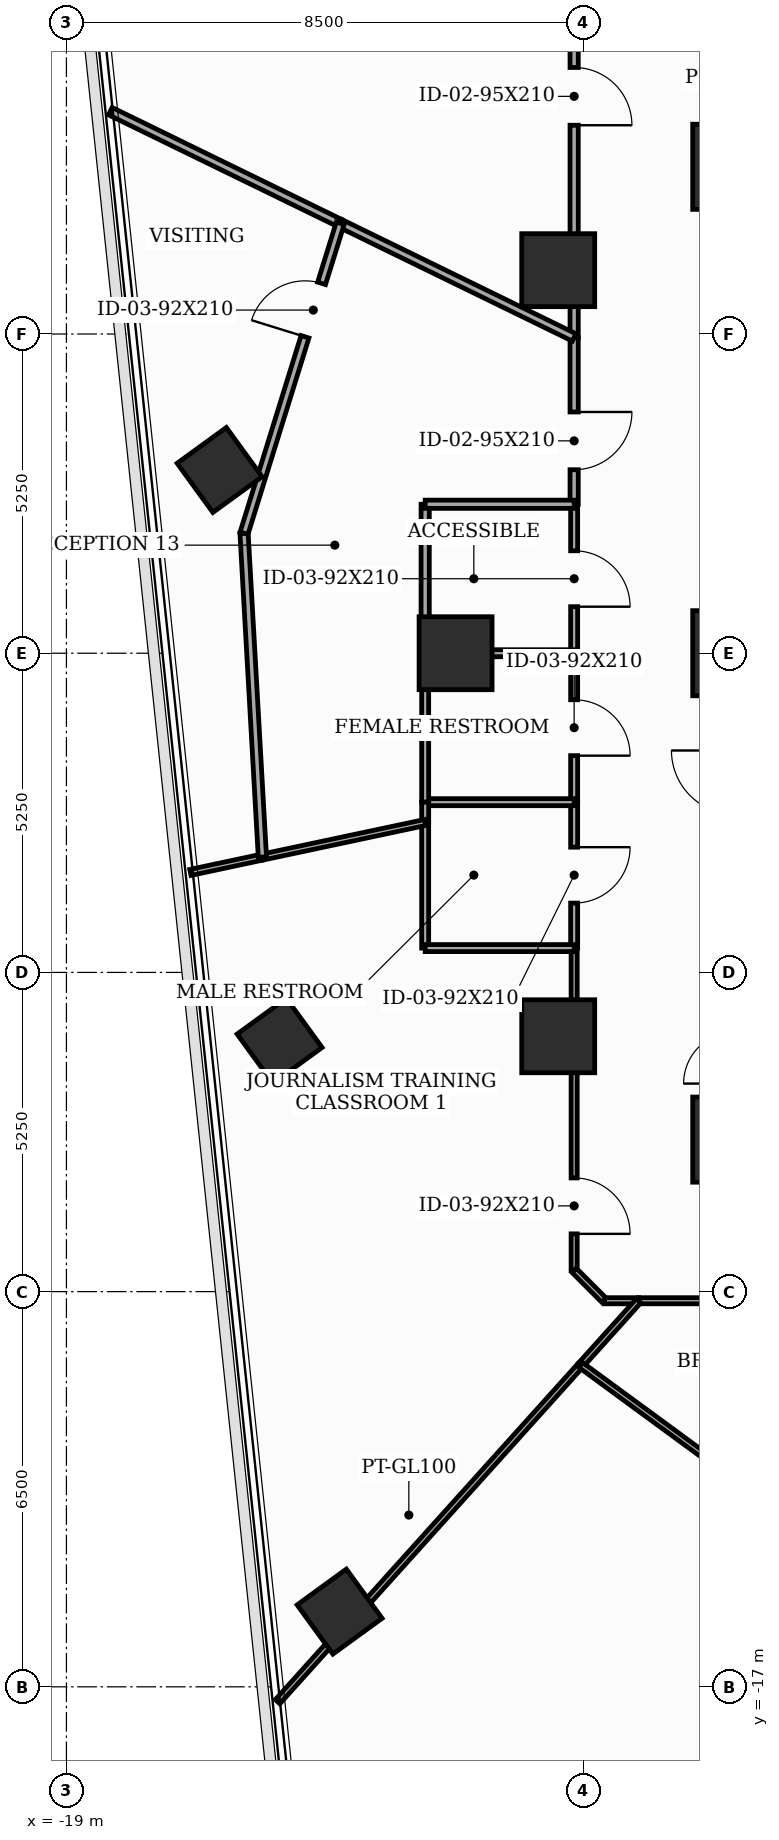
"""IFC4 building model, lengths in metres.
Left out: names, types, materials, properties, quantities, classifications, styles, units other than length and angle.
Written with IfcOpenShell. Run it as: python <this file> out.ifc"""

import sys

from ifc_helpers import new_model, si_unit, direction, frame, frame_2d, origin, origin_2d, place, context, subcontext, project, spatial, rectangle, extrude, element, fill, save


model = new_model("IFC4")
c1 = context("Model", 3, precision=1e-05, world=origin(), true_north=direction((0.0, 1.0)))
c2 = subcontext(c1, "Body", "Model", "MODEL_VIEW")
j1 = project(units=[si_unit("LENGTHUNIT", "METRE"), si_unit("PLANEANGLEUNIT", "RADIAN")], contexts=[c1])
p1 = place(None, origin())
s1 = spatial("IfcSite", under=j1, at=p1, CompositionType="ELEMENT")
p2 = place(p1, origin())
s2 = spatial("IfcBuilding", under=s1, at=p2, CompositionType="ELEMENT")
p3 = place(p2, frame((0.0, 0.0, 169.4)))
s3 = spatial("IfcBuildingStorey", under=s2, at=p3, CompositionType="ELEMENT", Elevation=169.4)
for number, where, z_axis, x_axis in (
    (1, (-8.0, -8.0, 0.0), (0.0, 0.0, 1.0), (1.0, 0.0, 0.0)),
    (2, (-8.0, 8.0, 0.0), (0.0, 0.0, 1.0), (1.0, 0.0, 0.0)),
    (3, (-8.0, 0.0, 0.0), (0.0, 0.0, 1.0), (1.0, 0.0, 0.0)),
):
    element("IfcColumn", number, at=place(p3, frame(where, z_axis=z_axis, x_axis=x_axis)), inside=s3, PredefinedType="COLUMN", context=c2, shape_type="SweptSolid", body=[
        extrude(rectangle(XDim=1.4, YDim=1.4, at=origin_2d()), origin(), (0.0, 0.0, 1.0), 3.7),
    ])
for number, where, z_axis, x_axis in (
    (4, (-10.912, 6.3, 0.0), (0.0, 0.0, 1.0), (1.0, 0.0, 0.0)),
    (5, (-12.6, 0.0, 0.0), (0.0, 0.0, 1.0), (1.0, 0.0, 0.0)),
    (6, (-10.912, -6.3, 0.0), (0.0, 0.0, 1.0), (1.0, 0.0, 0.0)),
):
    element("IfcColumn", number, at=place(p3, frame(where, z_axis=z_axis, x_axis=x_axis)), inside=s3, PredefinedType="COLUMN", context=c2, shape_type="SweptSolid", body=[
        extrude(rectangle(XDim=1.2, YDim=1.2, at=origin_2d()), origin(), (0.0, 0.0, 1.0), 3.7),
    ])
for number, where, z_axis, x_axis in (
    (7, (-16.481, 3.014, 0.0), (0.0, 0.0, 1.0), (0.809, 0.588, 0.0)),
    (8, (-15.494, -6.375, 0.0), (0.0, 0.0, 1.0), (0.809, 0.588, 0.0)),
    (9, (-14.507, -15.763, 0.0), (0.0, 0.0, 1.0), (0.809, 0.588, 0.0)),
):
    element("IfcColumn", number, at=place(p3, frame(where, z_axis=z_axis, x_axis=x_axis)), inside=s3, PredefinedType="COLUMN", context=c2, shape_type="SweptSolid", body=[
        extrude(rectangle(XDim=1.0, YDim=1.0, at=origin_2d()), origin(), (0.0, 0.0, 1.0), 3.7),
    ])
p4 = place(p3, frame((-10.65, 0.0, 0.0), z_axis=(0.0, 0.0, 1.0), x_axis=(0.0, -1.0, 0.0)))
e10 = element("IfcWall", 10, at=p4, inside=s3, PredefinedType="PARTITIONING", context=c2, shape_type="SweptSolid", body=[
    extrude(rectangle(XDim=2.45, YDim=0.115, at=frame_2d((1.225, 0.0))), origin(), (0.0, 0.0, 1.0), 2.885),
])
p5 = place(p4, frame((0.765, 0.0, 0.0)))
e11 = element("IfcOpeningElement", 11, at=p5, cuts=e10, PredefinedType="OPENING", context=c2, shape_type="SweptSolid", body=[
    extrude(rectangle(XDim=0.92, YDim=2.1, at=frame_2d((0.46, 1.05))), frame((0.0, 0.067, 0.0), z_axis=(0.0, -1.0, 0.0), x_axis=(1.0, 0.0, 0.0)), (0.0, 0.0, 1.0), 0.135),
])
p6 = place(p3, frame((-10.65, -2.45, 0.0), z_axis=(0.0, 0.0, 1.0), x_axis=(0.0, -1.0, 0.0)))
e12 = element("IfcWall", 12, at=p6, inside=s3, PredefinedType="PARTITIONING", context=c2, shape_type="SweptSolid", body=[
    extrude(rectangle(XDim=2.4, YDim=0.115, at=frame_2d((1.2, 0.0))), origin(), (0.0, 0.0, 1.0), 3.5),
])
p7 = place(p6, frame((0.74, 0.0, 0.0)))
e13 = element("IfcOpeningElement", 13, at=p7, cuts=e12, PredefinedType="OPENING", context=c2, shape_type="SweptSolid", body=[
    extrude(rectangle(XDim=0.92, YDim=2.1, at=frame_2d((0.46, 1.05))), frame((0.0, 0.067, 0.0), z_axis=(0.0, -1.0, 0.0), x_axis=(1.0, 0.0, 0.0)), (0.0, 0.0, 1.0), 0.135),
])
p8 = place(p3, frame((-10.65, -4.85, 0.0), z_axis=(0.0, 0.0, 1.0), x_axis=(0.0, -1.0, 0.0)))
e14 = element("IfcWall", 14, at=p8, inside=s3, PredefinedType="MOVABLE", context=c2, shape_type="SweptSolid", body=[
    extrude(rectangle(XDim=5.3, YDim=0.1, at=frame_2d((2.65, 0.0))), origin(), (0.0, 0.0, 1.0), 2.885),
])
p9 = place(p8, frame((3.78, 0.0, 0.0)))
e15 = element("IfcOpeningElement", 15, at=p9, cuts=e14, PredefinedType="OPENING", context=c2, shape_type="SweptSolid", body=[
    extrude(rectangle(XDim=0.92, YDim=2.1, at=frame_2d((0.46, 1.05))), frame((0.0, 0.06, 0.0), z_axis=(0.0, -1.0, 0.0), x_axis=(1.0, 0.0, 0.0)), (0.0, 0.0, 1.0), 0.12),
])
p10 = place(p3, frame((-10.65, -10.15, 0.0), z_axis=(0.0, 0.0, 1.0), x_axis=(0.707106781187, -0.707106781187, 0.0)))
e16 = element("IfcWall", 16, at=p10, inside=s3, PredefinedType="MOVABLE", context=c2, shape_type="SweptSolid", body=[
    extrude(rectangle(XDim=0.707, YDim=0.1, at=frame_2d((0.354, 0.0))), origin(), (0.0, 0.0, 1.0), 3.5),
])
p11 = place(p3, frame((-10.15, -10.65, 0.0), z_axis=(0.0, 0.0, 1.0), x_axis=(1.0, 0.0, 0.0)))
e17 = element("IfcWall", 17, at=p11, inside=s3, PredefinedType="MOVABLE", context=c2, shape_type="SweptSolid", body=[
    extrude(rectangle(XDim=0.561, YDim=0.1, at=frame_2d((0.28, 0.0))), origin(), (0.0, 0.0, 1.0), 3.5),
])
p12 = place(p3, frame((-9.589, -10.65, 0.0), z_axis=(0.0, 0.0, 1.0), x_axis=(1.0, 0.0, 0.0)))
e18 = element("IfcWall", 18, at=p12, inside=s3, PredefinedType="MOVABLE", context=c2, shape_type="SweptSolid", body=[
    extrude(rectangle(XDim=6.535, YDim=0.1, at=frame_2d((3.268, 0.0))), origin(), (0.0, 0.0, 1.0), 2.885),
])
p13 = place(p3, frame((-10.65, 10.15, 0.0), z_axis=(0.0, 0.0, 1.0), x_axis=(0.0, -1.0, 0.0)))
e19 = element("IfcWall", 19, at=p13, inside=s3, PredefinedType="PARTITIONING", context=c2, shape_type="SweptSolid", body=[
    extrude(rectangle(XDim=4.956, YDim=0.135, at=frame_2d((2.478, 0.0))), origin(), (0.0, 0.0, 1.0), 2.885),
])
p14 = place(p13, frame((0.516, 0.0, 0.0)))
e20 = element("IfcOpeningElement", 20, at=p14, cuts=e19, PredefinedType="OPENING", context=c2, shape_type="SweptSolid", body=[
    extrude(rectangle(XDim=0.95, YDim=2.1, at=frame_2d((0.475, 1.05))), frame((0.0, 0.077, 0.0), z_axis=(0.0, -1.0, 0.0), x_axis=(1.0, 0.0, 0.0)), (0.0, 0.0, 1.0), 0.155),
])
p15 = place(p3, frame((-10.65, 5.194, 0.0), z_axis=(0.0, 0.0, 1.0), x_axis=(0.0, -1.0, 0.0)))
e21 = element("IfcWall", 21, at=p15, inside=s3, PredefinedType="PARTITIONING", context=c2, shape_type="SweptSolid", body=[
    extrude(rectangle(XDim=2.744, YDim=0.135, at=frame_2d((1.372, 0.0))), origin(), (0.0, 0.0, 1.0), 3.5),
])
p16 = place(p15, frame((1.226, 0.0, 0.0)))
e22 = element("IfcOpeningElement", 22, at=p16, cuts=e21, PredefinedType="OPENING", context=c2, shape_type="SweptSolid", body=[
    extrude(rectangle(XDim=0.95, YDim=2.1, at=frame_2d((0.475, 1.05))), frame((0.0, 0.077, 0.0), z_axis=(0.0, -1.0, 0.0), x_axis=(1.0, 0.0, 0.0)), (0.0, 0.0, 1.0), 0.155),
])
p17 = place(p3, frame((-10.65, 2.45, 0.0), z_axis=(0.0, 0.0, 1.0), x_axis=(0.0, -1.0, 0.0)))
e23 = element("IfcWall", 23, at=p17, inside=s3, PredefinedType="PARTITIONING", context=c2, shape_type="SweptSolid", body=[
    extrude(rectangle(XDim=2.45, YDim=0.115, at=frame_2d((1.225, 0.0))), origin(), (0.0, 0.0, 1.0), 2.885),
])
p18 = place(p17, frame((0.765, 0.0, 0.0)))
e24 = element("IfcOpeningElement", 24, at=p18, cuts=e23, PredefinedType="OPENING", context=c2, shape_type="SweptSolid", body=[
    extrude(rectangle(XDim=0.92, YDim=2.1, at=frame_2d((0.46, 1.05))), frame((0.0, 0.067, 0.0), z_axis=(0.0, -1.0, 0.0), x_axis=(1.0, 0.0, 0.0)), (0.0, 0.0, 1.0), 0.135),
])
p19 = place(p3, frame((-13.1, -2.45, 0.0), z_axis=(0.0, 0.0, 1.0), x_axis=(1.0, 0.0, 0.0)))
e25 = element("IfcWall", 25, at=p19, inside=s3, PredefinedType="PARTITIONING", context=c2, shape_type="SweptSolid", body=[
    extrude(rectangle(XDim=2.45, YDim=0.115, at=frame_2d((1.225, 0.0))), origin(), (0.0, 0.0, 1.0), 2.885),
])
p20 = place(p3, frame((-13.1, 0.0, 0.0), z_axis=(0.0, 0.0, 1.0), x_axis=(0.0, -1.0, 0.0)))
e26 = element("IfcWall", 26, at=p20, inside=s3, PredefinedType="PARTITIONING", context=c2, shape_type="SweptSolid", body=[
    extrude(rectangle(XDim=2.45, YDim=0.115, at=frame_2d((1.225, 0.0))), origin(), (0.0, 0.0, 1.0), 3.5),
])
p21 = place(p3, frame((-10.65, 0.0, 0.0), z_axis=(0.0, 0.0, 1.0), x_axis=(-1.0, 0.0, 0.0)))
e27 = element("IfcWall", 27, at=p21, inside=s3, PredefinedType="PARTITIONING", context=c2, shape_type="SweptSolid", body=[
    extrude(rectangle(XDim=2.45, YDim=0.115, at=frame_2d((1.225, 0.0))), origin(), (0.0, 0.0, 1.0), 2.885),
])
p22 = place(p3, frame((-13.1, -2.784, 0.0), z_axis=(0.0, 0.0, 1.0), x_axis=(0.0, -1.0, 0.0)))
e28 = element("IfcWall", 28, at=p22, inside=s3, PredefinedType="PARTITIONING", context=c2, shape_type="SweptSolid", body=[
    extrude(rectangle(XDim=2.066, YDim=0.115, at=frame_2d((1.033, 0.0))), origin(), (0.0, 0.0, 1.0), 3.5),
])
p23 = place(p3, frame((-13.1, -4.85, 0.0), z_axis=(0.0, 0.0, 1.0), x_axis=(1.0, 0.0, 0.0)))
e29 = element("IfcWall", 29, at=p23, inside=s3, PredefinedType="PARTITIONING", context=c2, shape_type="SweptSolid", body=[
    extrude(rectangle(XDim=2.45, YDim=0.115, at=frame_2d((1.225, 0.0))), origin(), (0.0, 0.0, 1.0), 2.885),
])
p24 = place(p3, frame((-13.1, -2.45, 0.0), z_axis=(0.0, 0.0, 1.0), x_axis=(0.0, -1.0, 0.0)))
e30 = element("IfcWall", 30, at=p24, inside=s3, PredefinedType="PARTITIONING", context=c2, shape_type="SweptSolid", body=[
    extrude(rectangle(XDim=0.334, YDim=0.115, at=frame_2d((0.167, 0.0))), origin(), (0.0, 0.0, 1.0), 3.5),
])
p25 = place(p3, frame((-10.541, -11.707, 0.0), z_axis=(0.0, 0.0, 1.0), x_axis=(0.669154347467, 0.743123448201, 0.0)))
e31 = element("IfcWall", 31, at=p25, inside=s3, PredefinedType="MOVABLE", context=c2, shape_type="SweptSolid", body=[
    extrude(rectangle(XDim=1.423, YDim=0.1, at=frame_2d((0.711, 0.0))), origin(), (0.0, 0.0, 1.0), 3.5),
])
p26 = place(p3, frame((-15.528, -17.245, 0.0), z_axis=(0.0, 0.0, 1.0), x_axis=(0.669169234172, 0.74311004302, 0.0)))
e32 = element("IfcWall", 32, at=p26, inside=s3, PredefinedType="MOVABLE", context=c2, shape_type="SweptSolid", body=[
    extrude(rectangle(XDim=7.452, YDim=0.1, at=frame_2d((3.726, 0.0))), origin(), (0.0, 0.0, 1.0), 2.885),
])
p27 = place(p3, frame((-15.777, -3.353, 0.0), z_axis=(0.0, 0.0, 1.0), x_axis=(-0.978029023755, -0.208468771503, 0.0)))
e33 = element("IfcWall", 33, at=p27, inside=s3, PredefinedType="MOVABLE", context=c2, shape_type="SweptSolid", body=[
    extrude(rectangle(XDim=1.211, YDim=0.1, at=frame_2d((0.605, 0.0))), origin(), (0.0, 0.0, 1.0), 2.985),
])
p28 = place(p3, frame((-13.1, -2.784, 0.0), z_axis=(0.0, 0.0, 1.0), x_axis=(-0.978141843994, -0.207938772307, 0.0)))
e34 = element("IfcWall", 34, at=p28, inside=s3, PredefinedType="MOVABLE", context=c2, shape_type="SweptSolid", body=[
    extrude(rectangle(XDim=2.737, YDim=0.1, at=frame_2d((1.368, 0.0))), origin(), (0.0, 0.0, 1.0), 2.985),
])
p29 = place(p3, frame((-10.541, -11.707, 0.0), z_axis=(0.0, 0.0, 1.0), x_axis=(0.806504929698, -0.591227366055, 0.0)))
e35 = element("IfcWall", 35, at=p29, inside=s3, PredefinedType="MOVABLE", context=c2, shape_type="SweptSolid", body=[
    extrude(rectangle(XDim=3.572, YDim=0.1, at=frame_2d((1.786, 0.0))), origin(), (0.0, 0.0, 1.0), 2.885),
])
p30 = place(p3, frame((-18.277, 8.915, 0.0), z_axis=(0.0, 0.0, 1.0), x_axis=(0.898795221882, -0.43836873648, 0.0)))
e36 = element("IfcWall", 36, at=p30, inside=s3, PredefinedType="PARTITIONING", context=c2, shape_type="SweptSolid", body=[
    extrude(rectangle(XDim=4.206, YDim=0.135, at=frame_2d((2.103, 0.0))), origin(), (0.0, 0.0, 1.0), 2.985),
])
p31 = place(p3, frame((-14.497, 7.071, 0.0), z_axis=(0.0, 0.0, 1.0), x_axis=(0.89874213328, -0.438477568261, 0.0)))
e37 = element("IfcWall", 37, at=p31, inside=s3, PredefinedType="PARTITIONING", context=c2, shape_type="SweptSolid", body=[
    extrude(rectangle(XDim=4.281, YDim=0.135, at=frame_2d((2.14, 0.0))), origin(), (0.0, 0.0, 1.0), 2.885),
])
p32 = place(p3, frame((-15.777, -3.353, 0.0), z_axis=(0.0, 0.0, 1.0), x_axis=(-0.056600228811, 0.99839692212, 0.0)))
e38 = element("IfcWall", 38, at=p32, inside=s3, PredefinedType="PARTITIONING", context=c2, shape_type="SweptSolid", body=[
    extrude(rectangle(XDim=5.336, YDim=0.135, at=frame_2d((2.668, 0.0))), origin(), (0.0, 0.0, 1.0), 2.985),
])
p33 = place(p3, frame((-16.079, 1.974, 0.0), z_axis=(0.0, 0.0, 1.0), x_axis=(0.296438064518, 0.955052079158, 0.0)))
e39 = element("IfcWall", 39, at=p33, inside=s3, PredefinedType="PARTITIONING", context=c2, shape_type="SweptSolid", body=[
    extrude(rectangle(XDim=5.337, YDim=0.135, at=frame_2d((2.668, 0.0))), origin(), (0.0, 0.0, 1.0), 2.885),
])
p34 = place(p33, frame((3.383, 0.0, 0.0)))
e40 = element("IfcOpeningElement", 40, at=p34, cuts=e39, PredefinedType="OPENING", context=c2, shape_type="SweptSolid", body=[
    extrude(rectangle(XDim=0.92, YDim=2.1, at=frame_2d((0.46, 1.05))), frame((0.0, 0.077, 0.0), z_axis=(0.0, -1.0, 0.0), x_axis=(1.0, 0.0, 0.0)), (0.0, 0.0, 1.0), 0.155),
])
p35 = place(p3, frame((-13.1, 0.0, 0.0), z_axis=(0.0, 0.0, 1.0), x_axis=(0.0, 1.0, 0.0)))
e41 = element("IfcWall", 41, at=p35, inside=s3, PredefinedType="PARTITIONING", context=c2, shape_type="SweptSolid", body=[
    extrude(rectangle(XDim=2.45, YDim=0.135, at=frame_2d((1.225, 0.0))), origin(), (0.0, 0.0, 1.0), 2.885),
])
p36 = place(p3, frame((-13.1, 2.45, 0.0), z_axis=(0.0, 0.0, 1.0), x_axis=(1.0, 0.0, 0.0)))
e42 = element("IfcWall", 42, at=p36, inside=s3, PredefinedType="PARTITIONING", context=c2, shape_type="SweptSolid", body=[
    extrude(rectangle(XDim=2.45, YDim=0.135, at=frame_2d((1.225, 0.0))), origin(), (0.0, 0.0, 1.0), 2.885),
])
p37 = place(p5, origin())
e43 = element("IfcDoor", 43, at=p37, inside=s3, OperationType="SINGLE_SWING_RIGHT", PredefinedType="DOOR", context=c2, shape_type="SweptSolid", body=[
    extrude(rectangle(XDim=0.92, YDim=2.1, at=frame_2d((0.46, 1.05))), frame((0.0, 0.025, 0.0), z_axis=(0.0, -1.0, 0.0), x_axis=(1.0, 0.0, 0.0)), (0.0, 0.0, 1.0), 0.05),
])
fill(e11, e43)
p38 = place(p7, origin())
e44 = element("IfcDoor", 44, at=p38, inside=s3, OperationType="SINGLE_SWING_LEFT", PredefinedType="DOOR", context=c2, shape_type="SweptSolid", body=[
    extrude(rectangle(XDim=0.92, YDim=2.1, at=frame_2d((0.46, 1.05))), frame((0.0, 0.025, 0.0), z_axis=(0.0, -1.0, 0.0), x_axis=(1.0, 0.0, 0.0)), (0.0, 0.0, 1.0), 0.05),
])
fill(e13, e44)
p39 = place(p9, origin())
e45 = element("IfcDoor", 45, at=p39, inside=s3, OperationType="SINGLE_SWING_RIGHT", PredefinedType="DOOR", context=c2, shape_type="SweptSolid", body=[
    extrude(rectangle(XDim=0.92, YDim=2.1, at=frame_2d((0.46, 1.05))), frame((0.0, 0.025, 0.0), z_axis=(0.0, -1.0, 0.0), x_axis=(1.0, 0.0, 0.0)), (0.0, 0.0, 1.0), 0.05),
])
fill(e15, e45)
p40 = place(p14, origin())
e46 = element("IfcDoor", 46, at=p40, inside=s3, OperationType="SINGLE_SWING_RIGHT", PredefinedType="DOOR", context=c2, shape_type="SweptSolid", body=[
    extrude(rectangle(XDim=0.95, YDim=2.1, at=frame_2d((0.475, 1.05))), frame((0.0, 0.025, 0.0), z_axis=(0.0, -1.0, 0.0), x_axis=(1.0, 0.0, 0.0)), (0.0, 0.0, 1.0), 0.05),
])
fill(e20, e46)
p41 = place(p16, origin())
e47 = element("IfcDoor", 47, at=p41, inside=s3, OperationType="SINGLE_SWING_LEFT", PredefinedType="DOOR", context=c2, shape_type="SweptSolid", body=[
    extrude(rectangle(XDim=0.95, YDim=2.1, at=frame_2d((0.475, 1.05))), frame((0.0, 0.025, 0.0), z_axis=(0.0, -1.0, 0.0), x_axis=(1.0, 0.0, 0.0)), (0.0, 0.0, 1.0), 0.05),
])
fill(e22, e47)
p42 = place(p18, origin())
e48 = element("IfcDoor", 48, at=p42, inside=s3, OperationType="SINGLE_SWING_RIGHT", PredefinedType="DOOR", context=c2, shape_type="SweptSolid", body=[
    extrude(rectangle(XDim=0.92, YDim=2.1, at=frame_2d((0.46, 1.05))), frame((0.0, 0.025, 0.0), z_axis=(0.0, -1.0, 0.0), x_axis=(1.0, 0.0, 0.0)), (0.0, 0.0, 1.0), 0.05),
])
fill(e24, e48)
p43 = place(p34, origin())
e49 = element("IfcDoor", 49, at=p43, inside=s3, OperationType="SINGLE_SWING_LEFT", PredefinedType="DOOR", context=c2, shape_type="SweptSolid", body=[
    extrude(rectangle(XDim=0.92, YDim=2.1, at=frame_2d((0.46, 1.05))), frame((0.0, 0.025, 0.0), z_axis=(0.0, -1.0, 0.0), x_axis=(1.0, 0.0, 0.0)), (0.0, 0.0, 1.0), 0.05),
])
fill(e40, e49)
save(model, sys.argv[1])
